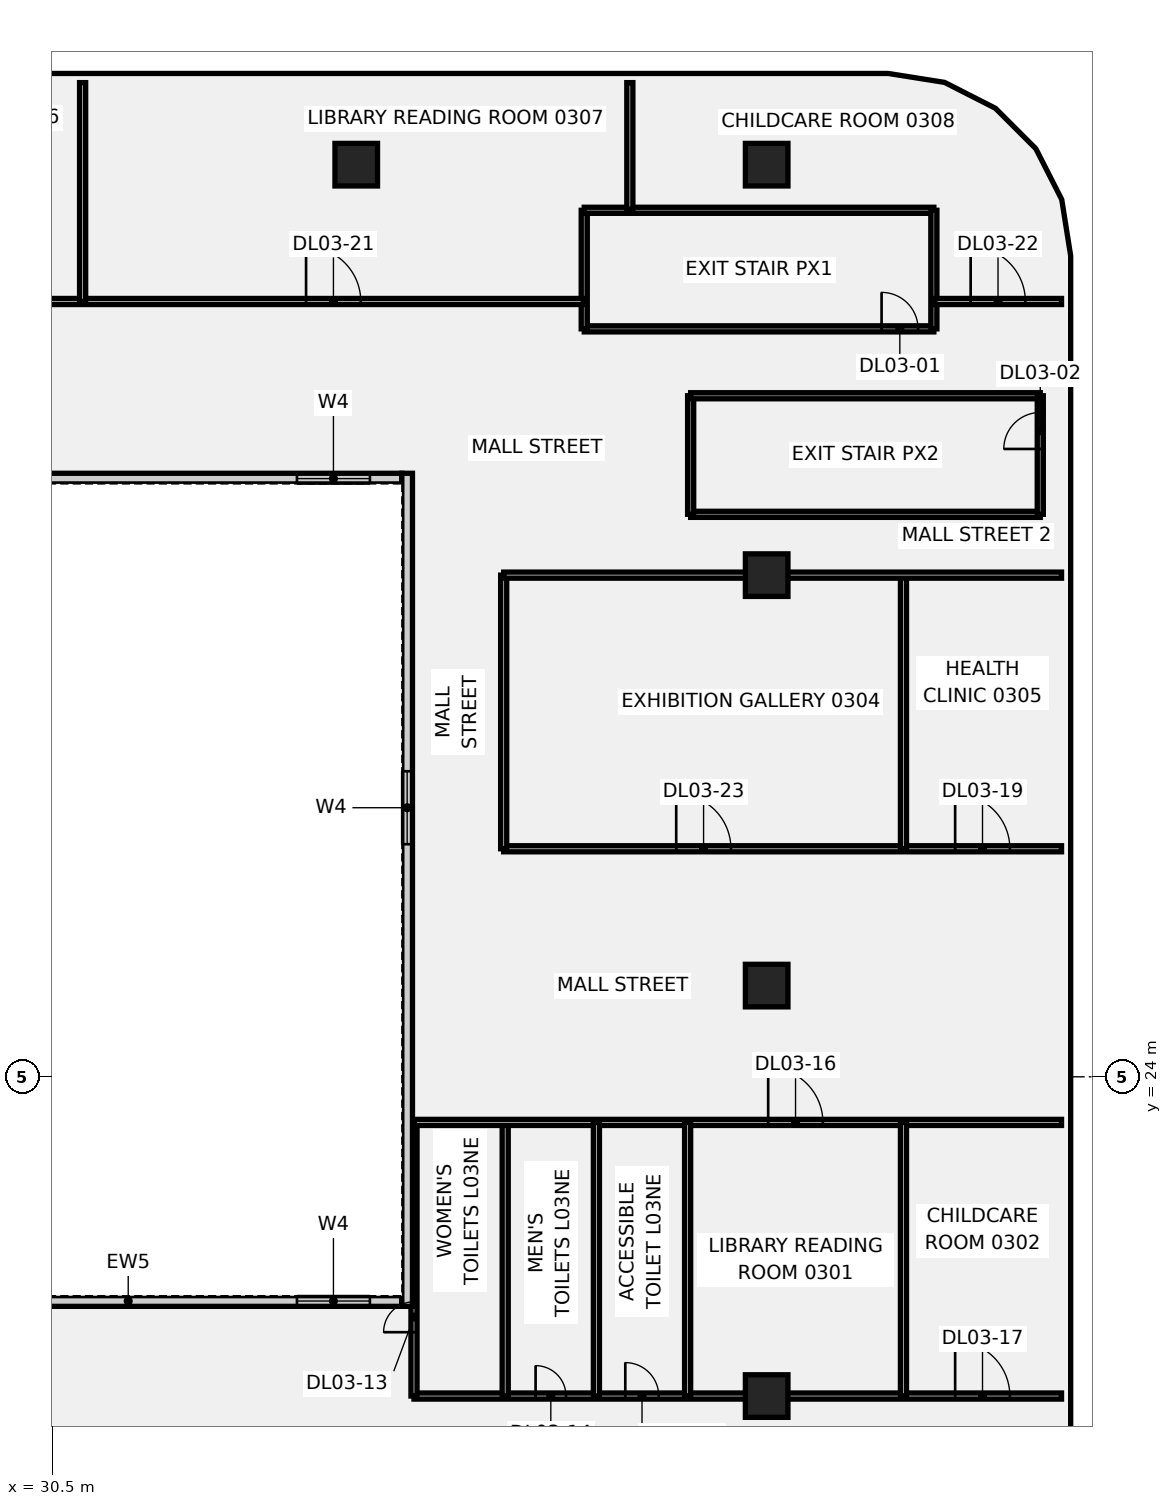
"""IFC4 building model, lengths in metres.
Left out: names, types, materials, properties, quantities, classifications, styles, units other than length and angle.
Written with IfcOpenShell. Run it as: python <this file> out.ifc"""

import sys

from ifc_helpers import new_model, si_unit, direction, frame, frame_2d, origin, origin_2d, place, context, subcontext, project, spatial, rectangle, extrude, element, fill, save


model = new_model("IFC4")
c1 = context("Model", 3, precision=1e-05, world=origin(), true_north=direction((0.0, 1.0)))
c2 = subcontext(c1, "Body", "Model", "MODEL_VIEW")
j1 = project(units=[si_unit("LENGTHUNIT", "METRE"), si_unit("PLANEANGLEUNIT", "RADIAN")], contexts=[c1])
p1 = place(None, origin())
s1 = spatial("IfcSite", under=j1, at=p1, CompositionType="ELEMENT")
p2 = place(p1, origin())
s2 = spatial("IfcBuilding", under=s1, at=p2, CompositionType="ELEMENT")
p3 = place(p2, frame((0.0, 0.0, 20.0)))
s3 = spatial("IfcBuildingStorey", under=s2, at=p3, CompositionType="ELEMENT", Elevation=20.0)
for number, where, z_axis, x_axis in (
    (1, (40.5, 54.0, -0.5), (0.0, 0.0, 1.0), (1.0, 0.0, 0.0)),
    (2, (54.0, 13.5, -0.5), (0.0, 0.0, 1.0), (1.0, 0.0, 0.0)),
    (3, (54.0, 27.0, -0.5), (0.0, 0.0, 1.0), (1.0, 0.0, 0.0)),
    (4, (54.0, 40.5, -0.5), (0.0, 0.0, 1.0), (1.0, 0.0, 0.0)),
    (5, (54.0, 54.0, -0.5), (0.0, 0.0, 1.0), (1.0, 0.0, 0.0)),
):
    element("IfcColumn", number, at=place(p3, frame(where, z_axis=z_axis, x_axis=x_axis)), inside=s3, PredefinedType="COLUMN", context=c2, shape_type="SweptSolid", body=[
        extrude(rectangle(XDim=1.4, YDim=1.4, at=origin_2d()), origin(), (0.0, 0.0, 1.0), 5.05),
    ])
p4 = place(p3, frame((48.0, 48.6, 0.0), z_axis=(0.0, 0.0, 1.0), x_axis=(1.0, 0.0, 0.0)))
e6 = element("IfcWall", 6, at=p4, inside=s3, PredefinedType="PARTITIONING", context=c2, shape_type="SweptSolid", body=[
    extrude(rectangle(XDim=11.5, YDim=0.2, at=frame_2d((5.75, 0.0))), origin(), (0.0, 0.0, 1.0), 4.55),
])
p5 = place(p4, frame((9.78, 0.0, 0.0)))
e7 = element("IfcOpeningElement", 7, at=p5, cuts=e6, PredefinedType="OPENING", context=c2, shape_type="SweptSolid", body=[
    extrude(rectangle(XDim=1.2, YDim=2.1, at=frame_2d((0.6, 1.05))), frame((0.0, 0.11, 0.0), z_axis=(0.0, -1.0, 0.0), x_axis=(1.0, 0.0, 0.0)), (0.0, 0.0, 1.0), 0.22),
])
p6 = place(p3, frame((48.0, 48.6, 0.0), z_axis=(0.0, 0.0, 1.0), x_axis=(0.0, 1.0, 0.0)))
e8 = element("IfcWall", 8, at=p6, inside=s3, PredefinedType="PARTITIONING", context=c2, shape_type="SweptSolid", body=[
    extrude(rectangle(XDim=3.9, YDim=0.2, at=frame_2d((1.95, 0.0))), origin(), (0.0, 0.0, 1.0), 4.55),
])
p7 = place(p3, frame((48.0, 52.5, 0.0), z_axis=(0.0, 0.0, 1.0), x_axis=(1.0, 0.0, 0.0)))
e9 = element("IfcWall", 9, at=p7, inside=s3, PredefinedType="PARTITIONING", context=c2, shape_type="SweptSolid", body=[
    extrude(rectangle(XDim=11.5, YDim=0.2, at=frame_2d((5.75, 0.0))), origin(), (0.0, 0.0, 1.0), 4.55),
])
p8 = place(p3, frame((59.5, 48.6, 0.0), z_axis=(0.0, 0.0, 1.0), x_axis=(0.0, 1.0, 0.0)))
e10 = element("IfcWall", 10, at=p8, inside=s3, PredefinedType="PARTITIONING", context=c2, shape_type="SweptSolid", body=[
    extrude(rectangle(XDim=3.9, YDim=0.2, at=frame_2d((1.95, 0.0))), origin(), (0.0, 0.0, 1.0), 4.55),
])
p9 = place(p3, frame((51.5, 42.5, 0.0), z_axis=(0.0, 0.0, 1.0), x_axis=(1.0, 0.0, 0.0)))
e11 = element("IfcWall", 11, at=p9, inside=s3, PredefinedType="PARTITIONING", context=c2, shape_type="SweptSolid", body=[
    extrude(rectangle(XDim=11.5, YDim=0.2, at=frame_2d((5.75, 0.0))), origin(), (0.0, 0.0, 1.0), 4.55),
])
p10 = place(p3, frame((51.5, 42.5, 0.0), z_axis=(0.0, 0.0, 1.0), x_axis=(0.0, 1.0, 0.0)))
e12 = element("IfcWall", 12, at=p10, inside=s3, PredefinedType="PARTITIONING", context=c2, shape_type="SweptSolid", body=[
    extrude(rectangle(XDim=3.9, YDim=0.2, at=frame_2d((1.95, 0.0))), origin(), (0.0, 0.0, 1.0), 4.55),
])
p11 = place(p3, frame((51.5, 46.4, 0.0), z_axis=(0.0, 0.0, 1.0), x_axis=(1.0, 0.0, 0.0)))
e13 = element("IfcWall", 13, at=p11, inside=s3, PredefinedType="PARTITIONING", context=c2, shape_type="SweptSolid", body=[
    extrude(rectangle(XDim=11.5, YDim=0.2, at=frame_2d((5.75, 0.0))), origin(), (0.0, 0.0, 1.0), 4.55),
])
p12 = place(p3, frame((63.0, 42.5, 0.0), z_axis=(0.0, 0.0, 1.0), x_axis=(0.0, 1.0, 0.0)))
e14 = element("IfcWall", 14, at=p12, inside=s3, PredefinedType="PARTITIONING", context=c2, shape_type="SweptSolid", body=[
    extrude(rectangle(XDim=3.9, YDim=0.2, at=frame_2d((1.95, 0.0))), origin(), (0.0, 0.0, 1.0), 4.55),
])
p13 = place(p12, frame((2.15, 0.0, 0.0)))
e15 = element("IfcOpeningElement", 15, at=p13, cuts=e14, PredefinedType="OPENING", context=c2, shape_type="SweptSolid", body=[
    extrude(rectangle(XDim=1.2, YDim=2.1, at=frame_2d((0.6, 1.05))), frame((0.0, 0.11, 0.0), z_axis=(0.0, -1.0, 0.0), x_axis=(1.0, 0.0, 0.0)), (0.0, 0.0, 1.0), 0.22),
])
p14 = place(p3, frame((19.53, 49.5, 0.0), z_axis=(0.0, 0.0, 1.0), x_axis=(1.0, 0.0, 0.0)))
e16 = element("IfcWall", 16, at=p14, inside=s3, PredefinedType="PARTITIONING", context=c2, shape_type="SweptSolid", body=[
    extrude(rectangle(XDim=28.44, YDim=0.2, at=frame_2d((14.22, 0.0))), origin(), (0.0, 0.0, 1.0), 4.55),
])
p15 = place(p14, frame((5.06, 0.0, 0.0)))
e17 = element("IfcOpeningElement", 17, at=p15, cuts=e16, PredefinedType="OPENING", context=c2, shape_type="SweptSolid", body=[
    extrude(rectangle(XDim=1.8, YDim=2.1, at=frame_2d((0.9, 1.05))), frame((0.0, 0.11, 0.0), z_axis=(0.0, -1.0, 0.0), x_axis=(1.0, 0.0, 0.0)), (0.0, 0.0, 1.0), 0.22),
])
p16 = place(p14, frame((19.32, 0.0, 0.0)))
e18 = element("IfcOpeningElement", 18, at=p16, cuts=e16, PredefinedType="OPENING", context=c2, shape_type="SweptSolid", body=[
    extrude(rectangle(XDim=1.8, YDim=2.1, at=frame_2d((0.9, 1.05))), frame((0.0, 0.11, 0.0), z_axis=(0.0, -1.0, 0.0), x_axis=(1.0, 0.0, 0.0)), (0.0, 0.0, 1.0), 0.22),
])
p17 = place(p3, frame((31.5, 49.5, 0.0), z_axis=(0.0, 0.0, 1.0), x_axis=(0.0, 1.0, 0.0)))
e19 = element("IfcWall", 19, at=p17, inside=s3, PredefinedType="PARTITIONING", context=c2, shape_type="SweptSolid", body=[
    extrude(rectangle(XDim=7.199, YDim=0.2, at=frame_2d((3.6, 0.0))), origin(), (0.0, 0.0, 1.0), 4.55),
])
p18 = place(p3, frame((42.4, 13.5, 0.0), z_axis=(0.0, 0.0, 1.0), x_axis=(1.0, 0.0, 0.0)))
e20 = element("IfcWall", 20, at=p18, inside=s3, PredefinedType="PARTITIONING", context=c2, shape_type="SweptSolid", body=[
    extrude(rectangle(XDim=21.299, YDim=0.2, at=frame_2d((10.649, 0.0))), origin(), (0.0, 0.0, 1.0), 4.55),
])
p19 = place(p18, frame((4.0, 0.0, 0.0)))
e21 = element("IfcOpeningElement", 21, at=p19, cuts=e20, PredefinedType="OPENING", context=c2, shape_type="SweptSolid", body=[
    extrude(rectangle(XDim=1.0, YDim=2.1, at=frame_2d((0.5, 1.05))), frame((0.0, 0.11, 0.0), z_axis=(0.0, -1.0, 0.0), x_axis=(1.0, 0.0, 0.0)), (0.0, 0.0, 1.0), 0.22),
])
p20 = place(p18, frame((6.95, 0.0, 0.0)))
e22 = element("IfcOpeningElement", 22, at=p20, cuts=e20, PredefinedType="OPENING", context=c2, shape_type="SweptSolid", body=[
    extrude(rectangle(XDim=1.1, YDim=2.1, at=frame_2d((0.55, 1.05))), frame((0.0, 0.11, 0.0), z_axis=(0.0, -1.0, 0.0), x_axis=(1.0, 0.0, 0.0)), (0.0, 0.0, 1.0), 0.22),
])
p21 = place(p18, frame((17.8, 0.0, 0.0)))
e23 = element("IfcOpeningElement", 23, at=p21, cuts=e20, PredefinedType="OPENING", context=c2, shape_type="SweptSolid", body=[
    extrude(rectangle(XDim=1.8, YDim=2.1, at=frame_2d((0.9, 1.05))), frame((0.0, 0.11, 0.0), z_axis=(0.0, -1.0, 0.0), x_axis=(1.0, 0.0, 0.0)), (0.0, 0.0, 1.0), 0.22),
])
p22 = place(p3, frame((45.4, 13.5, 0.0), z_axis=(0.0, 0.0, 1.0), x_axis=(0.0, 1.0, 0.0)))
e24 = element("IfcWall", 24, at=p22, inside=s3, PredefinedType="PARTITIONING", context=c2, shape_type="SweptSolid", body=[
    extrude(rectangle(XDim=9.0, YDim=0.2, at=frame_2d((4.5, 0.0))), origin(), (0.0, 0.0, 1.0), 4.55),
])
p23 = place(p3, frame((42.4, 13.5, 0.0), z_axis=(0.0, 0.0, 1.0), x_axis=(0.0, 1.0, 0.0)))
e25 = element("IfcWall", 25, at=p23, inside=s3, PredefinedType="PARTITIONING", context=c2, shape_type="SweptSolid", body=[
    extrude(rectangle(XDim=9.0, YDim=0.2, at=frame_2d((4.5, 0.0))), origin(), (0.0, 0.0, 1.0), 4.55),
])
p24 = place(p23, frame((2.1, 0.0, 0.0)))
e26 = element("IfcOpeningElement", 26, at=p24, cuts=e25, PredefinedType="OPENING", context=c2, shape_type="SweptSolid", body=[
    extrude(rectangle(XDim=1.0, YDim=2.1, at=frame_2d((0.5, 1.05))), frame((0.0, 0.11, 0.0), z_axis=(0.0, -1.0, 0.0), x_axis=(1.0, 0.0, 0.0)), (0.0, 0.0, 1.0), 0.22),
])
p25 = place(p3, frame((42.4, 22.5, 0.0), z_axis=(0.0, 0.0, 1.0), x_axis=(1.0, 0.0, 0.0)))
e27 = element("IfcWall", 27, at=p25, inside=s3, PredefinedType="PARTITIONING", context=c2, shape_type="SweptSolid", body=[
    extrude(rectangle(XDim=21.299, YDim=0.2, at=frame_2d((10.649, 0.0))), origin(), (0.0, 0.0, 1.0), 4.55),
])
p26 = place(p25, frame((11.65, 0.0, 0.0)))
e28 = element("IfcOpeningElement", 28, at=p26, cuts=e27, PredefinedType="OPENING", context=c2, shape_type="SweptSolid", body=[
    extrude(rectangle(XDim=1.8, YDim=2.1, at=frame_2d((0.9, 1.05))), frame((0.0, 0.11, 0.0), z_axis=(0.0, -1.0, 0.0), x_axis=(1.0, 0.0, 0.0)), (0.0, 0.0, 1.0), 0.22),
])
p27 = place(p3, frame((48.4, 13.5, 0.0), z_axis=(0.0, 0.0, 1.0), x_axis=(0.0, 1.0, 0.0)))
e29 = element("IfcWall", 29, at=p27, inside=s3, PredefinedType="PARTITIONING", context=c2, shape_type="SweptSolid", body=[
    extrude(rectangle(XDim=9.0, YDim=0.2, at=frame_2d((4.5, 0.0))), origin(), (0.0, 0.0, 1.0), 4.55),
])
p28 = place(p3, frame((49.5, 52.53, 0.0), z_axis=(0.0, 0.0, 1.0), x_axis=(0.0, 1.0, 0.0)))
e30 = element("IfcWall", 30, at=p28, inside=s3, PredefinedType="PARTITIONING", context=c2, shape_type="SweptSolid", body=[
    extrude(rectangle(XDim=4.169, YDim=0.2, at=frame_2d((2.084, 0.0))), origin(), (0.0, 0.0, 1.0), 4.55),
])
for number, where, z_axis, x_axis in (
    (31, (51.4, 13.5, 0.0), (0.0, 0.0, 1.0), (0.0, 1.0, 0.0)),
    (32, (58.5, 13.5, 0.0), (0.0, 0.0, 1.0), (0.0, 1.0, 0.0)),
):
    element("IfcWall", number, at=place(p3, frame(where, z_axis=z_axis, x_axis=x_axis)), inside=s3, PredefinedType="PARTITIONING", context=c2, shape_type="SweptSolid", body=[
        extrude(rectangle(XDim=9.0, YDim=0.2, at=frame_2d((4.5, 0.0))), origin(), (0.0, 0.0, 1.0), 4.55),
    ])
p29 = place(p3, frame((45.35, 31.5, 0.0), z_axis=(0.0, 0.0, 1.0), x_axis=(1.0, 0.0, 0.0)))
e33 = element("IfcWall", 33, at=p29, inside=s3, PredefinedType="PARTITIONING", context=c2, shape_type="SweptSolid", body=[
    extrude(rectangle(XDim=18.349, YDim=0.2, at=frame_2d((9.174, 0.0))), origin(), (0.0, 0.0, 1.0), 4.55),
])
p30 = place(p29, frame((14.85, 0.0, 0.0)))
e34 = element("IfcOpeningElement", 34, at=p30, cuts=e33, PredefinedType="OPENING", context=c2, shape_type="SweptSolid", body=[
    extrude(rectangle(XDim=1.8, YDim=2.1, at=frame_2d((0.9, 1.05))), frame((0.0, 0.11, 0.0), z_axis=(0.0, -1.0, 0.0), x_axis=(1.0, 0.0, 0.0)), (0.0, 0.0, 1.0), 0.22),
])
p31 = place(p29, frame((5.675, 0.0, 0.0)))
e35 = element("IfcOpeningElement", 35, at=p31, cuts=e33, PredefinedType="OPENING", context=c2, shape_type="SweptSolid", body=[
    extrude(rectangle(XDim=1.8, YDim=2.1, at=frame_2d((0.9, 1.05))), frame((0.0, 0.11, 0.0), z_axis=(0.0, -1.0, 0.0), x_axis=(1.0, 0.0, 0.0)), (0.0, 0.0, 1.0), 0.22),
])
for number, where, z_axis, x_axis in (
    (36, (58.5, 31.5, 0.0), (0.0, 0.0, 1.0), (0.0, 1.0, 0.0)),
    (37, (45.35, 31.5, 0.0), (0.0, 0.0, 1.0), (0.0, 1.0, 0.0)),
):
    element("IfcWall", number, at=place(p3, frame(where, z_axis=z_axis, x_axis=x_axis)), inside=s3, PredefinedType="PARTITIONING", context=c2, shape_type="SweptSolid", body=[
        extrude(rectangle(XDim=9.0, YDim=0.2, at=frame_2d((4.5, 0.0))), origin(), (0.0, 0.0, 1.0), 4.55),
    ])
p32 = place(p3, frame((45.35, 40.5, 0.0), z_axis=(0.0, 0.0, 1.0), x_axis=(1.0, 0.0, 0.0)))
e38 = element("IfcWall", 38, at=p32, inside=s3, PredefinedType="PARTITIONING", context=c2, shape_type="SweptSolid", body=[
    extrude(rectangle(XDim=18.349, YDim=0.2, at=frame_2d((9.174, 0.0))), origin(), (0.0, 0.0, 1.0), 4.55),
])
p33 = place(p3, frame((59.53, 49.5, 0.0), z_axis=(0.0, 0.0, 1.0), x_axis=(1.0, 0.0, 0.0)))
e39 = element("IfcWall", 39, at=p33, inside=s3, PredefinedType="PARTITIONING", context=c2, shape_type="SweptSolid", body=[
    extrude(rectangle(XDim=4.169, YDim=0.2, at=frame_2d((2.084, 0.0))), origin(), (0.0, 0.0, 1.0), 4.55),
])
p34 = place(p33, frame((1.18, 0.0, 0.0)))
e40 = element("IfcOpeningElement", 40, at=p34, cuts=e39, PredefinedType="OPENING", context=c2, shape_type="SweptSolid", body=[
    extrude(rectangle(XDim=1.8, YDim=2.1, at=frame_2d((0.9, 1.05))), frame((0.0, 0.11, 0.0), z_axis=(0.0, -1.0, 0.0), x_axis=(1.0, 0.0, 0.0)), (0.0, 0.0, 1.0), 0.22),
])
p35 = place(p3, frame((24.0, 16.625, 0.0), z_axis=(0.0, 0.0, 1.0), x_axis=(1.0, 0.0, 0.0)))
e41 = element("IfcWall", 41, at=p35, inside=s3, PredefinedType="SOLIDWALL", context=c2, shape_type="SweptSolid", body=[
    extrude(rectangle(XDim=18.0, YDim=0.35, at=frame_2d((9.0, 0.0))), origin(), (0.0, 0.0, 1.0), 4.55),
])
p36 = place(p35, frame((14.55, 0.0, 1.0)))
e42 = element("IfcOpeningElement", 42, at=p36, cuts=e41, PredefinedType="OPENING", context=c2, shape_type="SweptSolid", body=[
    extrude(rectangle(XDim=2.4, YDim=1.8, at=frame_2d((1.2, 0.9))), frame((0.0, 0.185, 0.0), z_axis=(0.0, -1.0, 0.0), x_axis=(1.0, 0.0, 0.0)), (0.0, 0.0, 1.0), 0.37),
])
p37 = place(p3, frame((24.0, 43.675, 0.0), z_axis=(0.0, 0.0, 1.0), x_axis=(1.0, 0.0, 0.0)))
e43 = element("IfcWall", 43, at=p37, inside=s3, PredefinedType="SOLIDWALL", context=c2, shape_type="SweptSolid", body=[
    extrude(rectangle(XDim=18.0, YDim=0.35, at=frame_2d((9.0, 0.0))), origin(), (0.0, 0.0, 1.0), 4.55),
])
p38 = place(p37, frame((14.55, 0.0, 1.0)))
e44 = element("IfcOpeningElement", 44, at=p38, cuts=e43, PredefinedType="OPENING", context=c2, shape_type="SweptSolid", body=[
    extrude(rectangle(XDim=2.4, YDim=1.8, at=frame_2d((1.2, 0.9))), frame((0.0, 0.185, 0.0), z_axis=(0.0, -1.0, 0.0), x_axis=(1.0, 0.0, 0.0)), (0.0, 0.0, 1.0), 0.37),
])
p39 = place(p3, frame((42.175, 16.45, 0.0), z_axis=(0.0, 0.0, 1.0), x_axis=(0.0, 1.0, 0.0)))
e45 = element("IfcWall", 45, at=p39, inside=s3, PredefinedType="SOLIDWALL", context=c2, shape_type="SweptSolid", body=[
    extrude(rectangle(XDim=27.4, YDim=0.35, at=frame_2d((13.7, 0.0))), origin(), (0.0, 0.0, 1.0), 4.55),
])
p40 = place(p39, frame((15.2, 0.0, 1.0)))
e46 = element("IfcOpeningElement", 46, at=p40, cuts=e45, PredefinedType="OPENING", context=c2, shape_type="SweptSolid", body=[
    extrude(rectangle(XDim=2.4, YDim=1.8, at=frame_2d((1.2, 0.9))), frame((0.0, 0.185, 0.0), z_axis=(0.0, -1.0, 0.0), x_axis=(1.0, 0.0, 0.0)), (0.0, 0.0, 1.0), 0.37),
])
p41 = place(p5, origin())
e47 = element("IfcDoor", 47, at=p41, inside=s3, OperationType="SINGLE_SWING_LEFT", PredefinedType="DOOR", context=c2, shape_type="SweptSolid", body=[
    extrude(rectangle(XDim=1.2, YDim=2.1, at=frame_2d((0.6, 1.05))), frame((0.0, 0.025, 0.0), z_axis=(0.0, -1.0, 0.0), x_axis=(1.0, 0.0, 0.0)), (0.0, 0.0, 1.0), 0.05),
])
fill(e7, e47)
p42 = place(p13, origin())
e48 = element("IfcDoor", 48, at=p42, inside=s3, OperationType="SINGLE_SWING_RIGHT", PredefinedType="DOOR", context=c2, shape_type="SweptSolid", body=[
    extrude(rectangle(XDim=1.2, YDim=2.1, at=frame_2d((0.6, 1.05))), frame((0.0, 0.025, 0.0), z_axis=(0.0, -1.0, 0.0), x_axis=(1.0, 0.0, 0.0)), (0.0, 0.0, 1.0), 0.05),
])
fill(e15, e48)
p43 = place(p24, origin())
e49 = element("IfcDoor", 49, at=p43, inside=s3, OperationType="SINGLE_SWING_LEFT", PredefinedType="DOOR", context=c2, shape_type="SweptSolid", body=[
    extrude(rectangle(XDim=1.0, YDim=2.1, at=frame_2d((0.5, 1.05))), frame((0.0, 0.025, 0.0), z_axis=(0.0, -1.0, 0.0), x_axis=(1.0, 0.0, 0.0)), (0.0, 0.0, 1.0), 0.05),
])
fill(e26, e49)
p44 = place(p19, origin())
e50 = element("IfcDoor", 50, at=p44, inside=s3, OperationType="SINGLE_SWING_RIGHT", PredefinedType="DOOR", context=c2, shape_type="SweptSolid", body=[
    extrude(rectangle(XDim=1.0, YDim=2.1, at=frame_2d((0.5, 1.05))), frame((0.0, 0.025, 0.0), z_axis=(0.0, -1.0, 0.0), x_axis=(1.0, 0.0, 0.0)), (0.0, 0.0, 1.0), 0.05),
])
fill(e21, e50)
p45 = place(p20, origin())
e51 = element("IfcDoor", 51, at=p45, inside=s3, OperationType="SINGLE_SWING_LEFT", PredefinedType="DOOR", context=c2, shape_type="SweptSolid", body=[
    extrude(rectangle(XDim=1.1, YDim=2.1, at=frame_2d((0.55, 1.05))), frame((0.0, 0.025, 0.0), z_axis=(0.0, -1.0, 0.0), x_axis=(1.0, 0.0, 0.0)), (0.0, 0.0, 1.0), 0.05),
])
fill(e22, e51)
p46 = place(p26, origin())
e52 = element("IfcDoor", 52, at=p46, inside=s3, OperationType="SINGLE_SWING_RIGHT", PredefinedType="DOOR", context=c2, shape_type="SweptSolid", body=[
    extrude(rectangle(XDim=1.8, YDim=2.1, at=frame_2d((0.9, 1.05))), frame((0.0, 0.025, 0.0), z_axis=(0.0, -1.0, 0.0), x_axis=(1.0, 0.0, 0.0)), (0.0, 0.0, 1.0), 0.05),
])
fill(e28, e52)
p47 = place(p21, origin())
e53 = element("IfcDoor", 53, at=p47, inside=s3, OperationType="SINGLE_SWING_LEFT", PredefinedType="DOOR", context=c2, shape_type="SweptSolid", body=[
    extrude(rectangle(XDim=1.8, YDim=2.1, at=frame_2d((0.9, 1.05))), frame((0.0, 0.025, 0.0), z_axis=(0.0, -1.0, 0.0), x_axis=(1.0, 0.0, 0.0)), (0.0, 0.0, 1.0), 0.05),
])
fill(e23, e53)
p48 = place(p30, origin())
e54 = element("IfcDoor", 54, at=p48, inside=s3, OperationType="SINGLE_SWING_LEFT", PredefinedType="DOOR", context=c2, shape_type="SweptSolid", body=[
    extrude(rectangle(XDim=1.8, YDim=2.1, at=frame_2d((0.9, 1.05))), frame((0.0, 0.025, 0.0), z_axis=(0.0, -1.0, 0.0), x_axis=(1.0, 0.0, 0.0)), (0.0, 0.0, 1.0), 0.05),
])
fill(e34, e54)
p49 = place(p16, origin())
e55 = element("IfcDoor", 55, at=p49, inside=s3, OperationType="SINGLE_SWING_LEFT", PredefinedType="DOOR", context=c2, shape_type="SweptSolid", body=[
    extrude(rectangle(XDim=1.8, YDim=2.1, at=frame_2d((0.9, 1.05))), frame((0.0, 0.025, 0.0), z_axis=(0.0, -1.0, 0.0), x_axis=(1.0, 0.0, 0.0)), (0.0, 0.0, 1.0), 0.05),
])
fill(e18, e55)
p50 = place(p34, origin())
e56 = element("IfcDoor", 56, at=p50, inside=s3, OperationType="SINGLE_SWING_RIGHT", PredefinedType="DOOR", context=c2, shape_type="SweptSolid", body=[
    extrude(rectangle(XDim=1.8, YDim=2.1, at=frame_2d((0.9, 1.05))), frame((0.0, 0.025, 0.0), z_axis=(0.0, -1.0, 0.0), x_axis=(1.0, 0.0, 0.0)), (0.0, 0.0, 1.0), 0.05),
])
fill(e40, e56)
p51 = place(p31, origin())
e57 = element("IfcDoor", 57, at=p51, inside=s3, OperationType="SINGLE_SWING_LEFT", PredefinedType="DOOR", context=c2, shape_type="SweptSolid", body=[
    extrude(rectangle(XDim=1.8, YDim=2.1, at=frame_2d((0.9, 1.05))), frame((0.0, 0.025, 0.0), z_axis=(0.0, -1.0, 0.0), x_axis=(1.0, 0.0, 0.0)), (0.0, 0.0, 1.0), 0.05),
])
fill(e35, e57)
p52 = place(p36, origin())
e58 = element("IfcWindow", 58, at=p52, inside=s3, PartitioningType="SINGLE_PANEL", PredefinedType="WINDOW", context=c2, shape_type="SweptSolid", body=[
    extrude(rectangle(XDim=2.4, YDim=1.8, at=frame_2d((1.2, 0.9))), frame((0.0, 0.03, 0.0), z_axis=(0.0, -1.0, 0.0), x_axis=(1.0, 0.0, 0.0)), (0.0, 0.0, 1.0), 0.06),
])
fill(e42, e58)
p53 = place(p38, origin())
e59 = element("IfcWindow", 59, at=p53, inside=s3, PartitioningType="SINGLE_PANEL", PredefinedType="WINDOW", context=c2, shape_type="SweptSolid", body=[
    extrude(rectangle(XDim=2.4, YDim=1.8, at=frame_2d((1.2, 0.9))), frame((0.0, 0.03, 0.0), z_axis=(0.0, -1.0, 0.0), x_axis=(1.0, 0.0, 0.0)), (0.0, 0.0, 1.0), 0.06),
])
fill(e44, e59)
p54 = place(p40, origin())
e60 = element("IfcWindow", 60, at=p54, inside=s3, PartitioningType="SINGLE_PANEL", PredefinedType="WINDOW", context=c2, shape_type="SweptSolid", body=[
    extrude(rectangle(XDim=2.4, YDim=1.8, at=frame_2d((1.2, 0.9))), frame((0.0, 0.03, 0.0), z_axis=(0.0, -1.0, 0.0), x_axis=(1.0, 0.0, 0.0)), (0.0, 0.0, 1.0), 0.06),
])
fill(e46, e60)
save(model, sys.argv[1])
